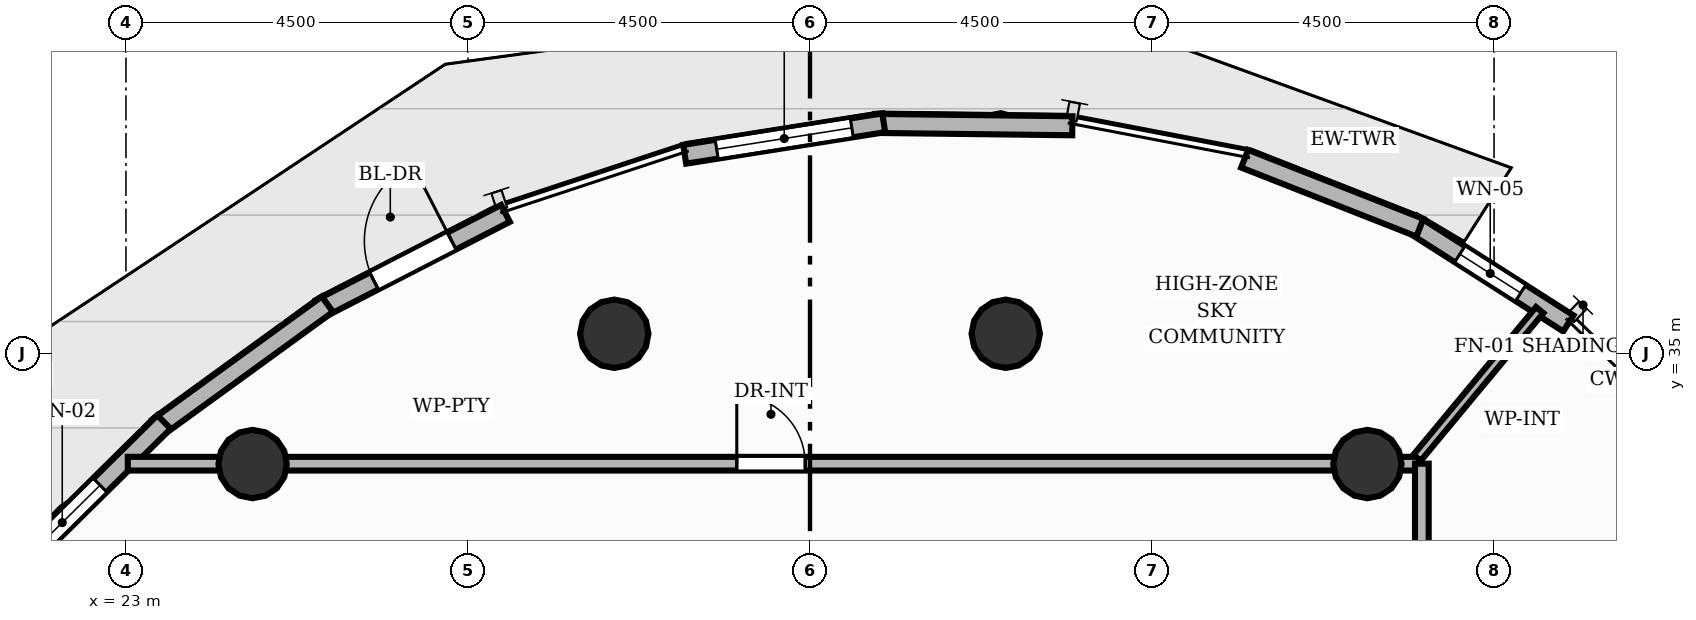
"""IFC4 building model, lengths in metres.
Left out: names, types, materials, properties, quantities, classifications, styles, units other than length and angle.
Written with IfcOpenShell. Run it as: python <this file> out.ifc"""

import sys

from ifc_helpers import new_model, si_unit, direction, frame, frame_2d, origin, origin_2d, place, context, subcontext, project, spatial, rectangle, circle, extrude, element, fill, save


model = new_model("IFC4")
c1 = context("Model", 3, precision=1e-05, world=origin(), true_north=direction((0.0, 1.0)))
c2 = subcontext(c1, "Body", "Model", "MODEL_VIEW")
j1 = project(units=[si_unit("LENGTHUNIT", "METRE"), si_unit("PLANEANGLEUNIT", "RADIAN")], contexts=[c1])
p1 = place(None, origin())
s1 = spatial("IfcSite", under=j1, at=p1, CompositionType="ELEMENT")
p2 = place(p1, origin())
s2 = spatial("IfcBuilding", under=s1, at=p2, CompositionType="ELEMENT")
p3 = place(p2, frame((0.0, 0.0, 163.04)))
s3 = spatial("IfcBuildingStorey", under=s2, at=p3, CompositionType="ELEMENT", Elevation=163.04)
for number, where, z_axis, x_axis in (
    (1, (39.333, 33.545, 0.0), (0.0, 0.0, 1.0), (1.0, 0.0, 0.0)),
    (2, (34.575, 35.26, 0.0), (0.0, 0.0, 1.0), (1.0, 0.0, 0.0)),
    (3, (29.425, 35.26, 0.0), (0.0, 0.0, 1.0), (1.0, 0.0, 0.0)),
    (4, (24.667, 33.545, 0.0), (0.0, 0.0, 1.0), (1.0, 0.0, 0.0)),
):
    element("IfcColumn", number, at=place(p3, frame(where, z_axis=z_axis, x_axis=x_axis)), inside=s3, PredefinedType="COLUMN", context=c2, shape_type="SweptSolid", body=[
        extrude(circle(Radius=0.45, at=origin_2d()), origin(), (0.0, 0.0, 1.0), 3.2),
    ])
p4 = place(p3, frame((39.923, 36.707, 0.0), z_axis=(0.0, 0.0, 1.0), x_axis=(0.842951209937, -0.537990016325, 0.0)))
e5 = element("IfcWall", 5, at=p4, inside=s3, PredefinedType="SOLIDWALL", context=c2, shape_type="SweptSolid", body=[
    extrude(rectangle(XDim=2.437, YDim=0.25, at=frame_2d((1.219, 0.0))), origin(), (0.0, 0.0, 1.0), 2.96),
])
p5 = place(p4, frame((0.743, 0.0, 0.85)))
e6 = element("IfcOpeningElement", 6, at=p5, cuts=e5, PredefinedType="OPENING", context=c2, shape_type="SweptSolid", body=[
    extrude(rectangle(XDim=0.95, YDim=1.45, at=frame_2d((0.475, 0.725))), frame((0.0, 0.135, 0.0), z_axis=(0.0, -1.0, 0.0), x_axis=(1.0, 0.0, 0.0)), (0.0, 0.0, 1.0), 0.27),
])
p6 = place(p3, frame((37.719, 37.563, 0.0), z_axis=(0.0, 0.0, 1.0), x_axis=(0.930554944455, -0.366152284371, 0.0)))
e7 = element("IfcWall", 7, at=p6, inside=s3, PredefinedType="SOLIDWALL", context=c2, shape_type="SweptSolid", body=[
    extrude(rectangle(XDim=2.478, YDim=0.25, at=frame_2d((1.239, 0.0))), origin(), (0.0, 0.0, 1.0), 2.96),
])
p7 = place(p3, frame((32.859, 38.027, 0.0), z_axis=(0.0, 0.0, 1.0), x_axis=(0.999928463579, -0.011961092105, 0.0)))
e8 = element("IfcWall", 8, at=p7, inside=s3, PredefinedType="SOLIDWALL", context=c2, shape_type="SweptSolid", body=[
    extrude(rectangle(XDim=2.592, YDim=0.25, at=frame_2d((1.296, 0.0))), origin(), (0.0, 0.0, 1.0), 2.96),
])
p8 = place(p3, frame((30.351, 37.621, 0.0), z_axis=(0.0, 0.0, 1.0), x_axis=(0.987726348775, 0.156194301867, 0.0)))
e9 = element("IfcWall", 9, at=p8, inside=s3, PredefinedType="SOLIDWALL", context=c2, shape_type="SweptSolid", body=[
    extrude(rectangle(XDim=2.651, YDim=0.25, at=frame_2d((1.325, 0.0))), origin(), (0.0, 0.0, 1.0), 2.96),
])
p9 = place(p8, frame((0.426, 0.0, 0.85)))
e10 = element("IfcOpeningElement", 10, at=p9, cuts=e9, PredefinedType="OPENING", context=c2, shape_type="SweptSolid", body=[
    extrude(rectangle(XDim=1.8, YDim=2.0, at=frame_2d((0.9, 1.0))), frame((0.0, 0.135, 0.0), z_axis=(0.0, -1.0, 0.0), x_axis=(1.0, 0.0, 0.0)), (0.0, 0.0, 1.0), 0.27),
])
p10 = place(p3, frame((25.558, 35.591, 0.0), z_axis=(0.0, 0.0, 1.0), x_axis=(0.889378950916, 0.457170735796, 0.0)))
e11 = element("IfcWall", 11, at=p10, inside=s3, PredefinedType="SOLIDWALL", context=c2, shape_type="SweptSolid", body=[
    extrude(rectangle(XDim=2.739, YDim=0.25, at=frame_2d((1.369, 0.0))), origin(), (0.0, 0.0, 1.0), 2.96),
])
p11 = place(p10, frame((0.794, 0.0, 0.0)))
e12 = element("IfcOpeningElement", 12, at=p11, cuts=e11, PredefinedType="OPENING", context=c2, shape_type="SweptSolid", body=[
    extrude(rectangle(XDim=1.15, YDim=2.2, at=frame_2d((0.575, 1.1))), frame((0.0, 0.135, 0.0), z_axis=(0.0, -1.0, 0.0), x_axis=(1.0, 0.0, 0.0)), (0.0, 0.0, 1.0), 0.27),
])
p12 = place(p3, frame((23.418, 34.028, 0.0), z_axis=(0.0, 0.0, 1.0), x_axis=(0.809302211878, 0.587392483651, 0.0)))
e13 = element("IfcWall", 13, at=p12, inside=s3, PredefinedType="SOLIDWALL", context=c2, shape_type="SweptSolid", body=[
    extrude(rectangle(XDim=2.758, YDim=0.25, at=frame_2d((1.379, 0.0))), origin(), (0.0, 0.0, 1.0), 2.96),
])
p13 = place(p3, frame((21.54, 32.16, 0.0), z_axis=(0.0, 0.0, 1.0), x_axis=(0.711211219647, 0.702978378792, 0.0)))
e14 = element("IfcWall", 14, at=p13, inside=s3, PredefinedType="SOLIDWALL", context=c2, shape_type="SweptSolid", body=[
    extrude(rectangle(XDim=2.758, YDim=0.25, at=frame_2d((1.379, 0.0))), origin(), (0.0, 0.0, 1.0), 2.96),
])
p14 = place(p13, frame((0.175, 0.0, 0.85)))
e15 = element("IfcOpeningElement", 15, at=p14, cuts=e14, PredefinedType="OPENING", context=c2, shape_type="SweptSolid", body=[
    extrude(rectangle(XDim=1.4, YDim=1.55, at=frame_2d((0.7, 0.775))), frame((0.0, 0.135, 0.0), z_axis=(0.0, -1.0, 0.0), x_axis=(1.0, 0.0, 0.0)), (0.0, 0.0, 1.0), 0.27),
])
p15 = place(p3, frame((23.024, 33.55, 0.0), z_axis=(0.0, 0.0, 1.0), x_axis=(1.0, 0.0, 0.0)))
e16 = element("IfcWall", 16, at=p15, inside=s3, PredefinedType="PARTITIONING", context=c2, shape_type="SweptSolid", body=[
    extrude(rectangle(XDim=17.026, YDim=0.18, at=frame_2d((8.513, 0.0))), origin(), (0.0, 0.0, 1.0), 2.488),
])
p16 = place(p15, frame((8.012, 0.0, 0.0)))
e17 = element("IfcOpeningElement", 17, at=p16, cuts=e16, PredefinedType="OPENING", context=c2, shape_type="SweptSolid", body=[
    extrude(rectangle(XDim=0.9, YDim=2.1, at=frame_2d((0.45, 1.05))), frame((0.0, 0.1, 0.0), z_axis=(0.0, -1.0, 0.0), x_axis=(1.0, 0.0, 0.0)), (0.0, 0.0, 1.0), 0.2),
])
p17 = place(p3, frame((40.05, 33.55, 0.0), z_axis=(0.0, 0.0, 1.0), x_axis=(0.0, -1.0, 0.0)))
e18 = element("IfcWall", 18, at=p17, inside=s3, PredefinedType="PARTITIONING", context=c2, shape_type="SweptSolid", body=[
    extrude(rectangle(XDim=19.1, YDim=0.18, at=frame_2d((9.55, 0.0))), origin(), (0.0, 0.0, 1.0), 2.955),
])
p18 = place(p17, frame((8.223, 0.0, 0.0)))
e19 = element("IfcOpeningElement", 19, at=p18, cuts=e18, PredefinedType="OPENING", context=c2, shape_type="SweptSolid", body=[
    extrude(rectangle(XDim=0.9, YDim=2.1, at=frame_2d((0.45, 1.05))), frame((0.0, 0.1, 0.0), z_axis=(0.0, -1.0, 0.0), x_axis=(1.0, 0.0, 0.0)), (0.0, 0.0, 1.0), 0.2),
])
p19 = place(p3, frame((41.6, 35.572, 0.0), z_axis=(0.0, 0.0, 1.0), x_axis=(-0.638500632437, -0.769621298027, 0.0)))
e20 = element("IfcWall", 20, at=p19, inside=s3, PredefinedType="PARTITIONING", context=c2, shape_type="SweptSolid", body=[
    extrude(rectangle(XDim=2.527, YDim=0.125, at=frame_2d((1.263, 0.0))), origin(), (0.0, 0.0, 1.0), 2.955),
])
p20 = place(p11, origin())
e21 = element("IfcDoor", 21, at=p20, inside=s3, OperationType="SINGLE_SWING_RIGHT", PredefinedType="DOOR", context=c2, shape_type="SweptSolid", body=[
    extrude(rectangle(XDim=1.15, YDim=2.2, at=frame_2d((0.575, 1.1))), frame((0.0, 0.025, 0.0), z_axis=(0.0, -1.0, 0.0), x_axis=(1.0, 0.0, 0.0)), (0.0, 0.0, 1.0), 0.05),
])
fill(e12, e21)
p21 = place(p5, origin())
e22 = element("IfcWindow", 22, at=p21, inside=s3, PartitioningType="SINGLE_PANEL", PredefinedType="WINDOW", context=c2, shape_type="SweptSolid", body=[
    extrude(rectangle(XDim=0.95, YDim=1.45, at=frame_2d((0.475, 0.725))), frame((0.0, 0.03, 0.0), z_axis=(0.0, -1.0, 0.0), x_axis=(1.0, 0.0, 0.0)), (0.0, 0.0, 1.0), 0.06),
])
fill(e6, e22)
p22 = place(p9, origin())
e23 = element("IfcWindow", 23, at=p22, inside=s3, PartitioningType="SINGLE_PANEL", PredefinedType="WINDOW", context=c2, shape_type="SweptSolid", body=[
    extrude(rectangle(XDim=1.8, YDim=2.0, at=frame_2d((0.9, 1.0))), frame((0.0, 0.03, 0.0), z_axis=(0.0, -1.0, 0.0), x_axis=(1.0, 0.0, 0.0)), (0.0, 0.0, 1.0), 0.06),
])
fill(e10, e23)
p23 = place(p14, origin())
e24 = element("IfcWindow", 24, at=p23, inside=s3, PartitioningType="SINGLE_PANEL", PredefinedType="WINDOW", context=c2, shape_type="SweptSolid", body=[
    extrude(rectangle(XDim=1.4, YDim=1.55, at=frame_2d((0.7, 0.775))), frame((0.0, 0.03, 0.0), z_axis=(0.0, -1.0, 0.0), x_axis=(1.0, 0.0, 0.0)), (0.0, 0.0, 1.0), 0.06),
])
fill(e15, e24)
p24 = place(p16, origin())
e25 = element("IfcDoor", 25, at=p24, inside=s3, OperationType="SINGLE_SWING_LEFT", PredefinedType="DOOR", context=c2, shape_type="SweptSolid", body=[
    extrude(rectangle(XDim=0.9, YDim=2.1, at=frame_2d((0.45, 1.05))), frame((0.0, 0.025, 0.0), z_axis=(0.0, -1.0, 0.0), x_axis=(1.0, 0.0, 0.0)), (0.0, 0.0, 1.0), 0.05),
])
fill(e17, e25)
save(model, sys.argv[1])
